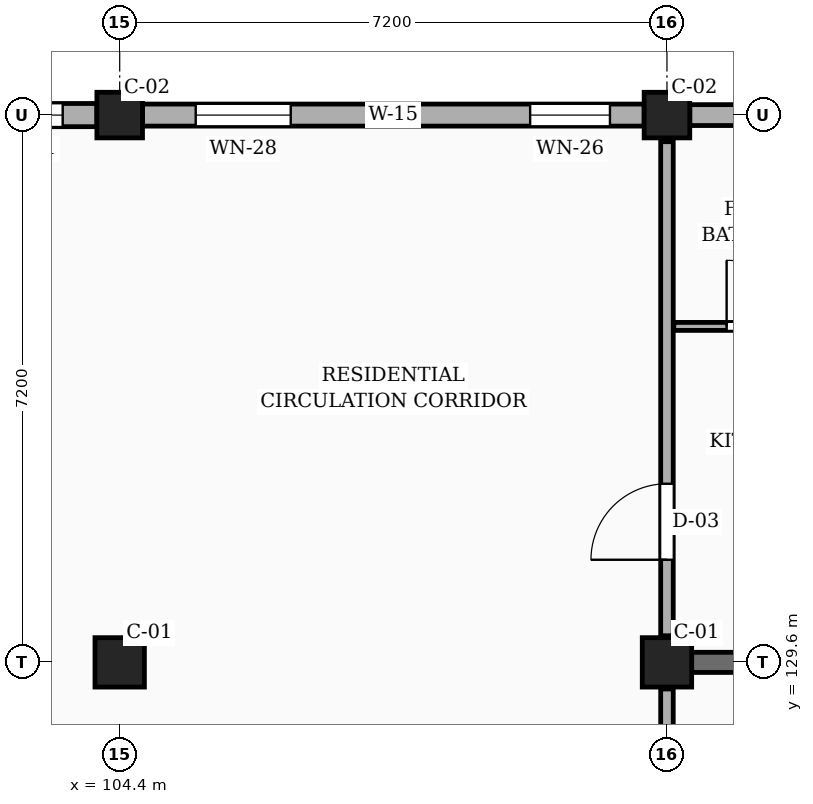
"""IFC4 building model, lengths in metres.
Left out: names, types, materials, properties, quantities, classifications, styles, units other than length and angle.
Written with IfcOpenShell. Run it as: python <this file> out.ifc"""

import sys

from ifc_helpers import new_model, si_unit, direction, frame, frame_2d, origin, origin_2d, place, context, subcontext, project, spatial, rectangle, extrude, element, fill, save


model = new_model("IFC4")
c1 = context("Model", 3, precision=1e-05, world=origin(), true_north=direction((0.0, 1.0)))
c2 = subcontext(c1, "Body", "Model", "MODEL_VIEW")
j1 = project(units=[si_unit("LENGTHUNIT", "METRE"), si_unit("PLANEANGLEUNIT", "RADIAN")], contexts=[c1])
p1 = place(None, origin())
s1 = spatial("IfcSite", under=j1, at=p1, CompositionType="ELEMENT")
p2 = place(p1, origin())
s2 = spatial("IfcBuilding", under=s1, at=p2, CompositionType="ELEMENT")
p3 = place(p2, frame((0.0, 0.0, 4.5)))
s3 = spatial("IfcBuildingStorey", under=s2, at=p3, CompositionType="ELEMENT", Elevation=4.5)
p4 = place(p3, frame((104.4, 129.6, 0.0), z_axis=(0.0, 0.0, 1.0), x_axis=(1.0, 0.0, 0.0)))
e1 = element("IfcColumn", 1, at=p4, inside=s3, PredefinedType="COLUMN", context=c2, shape_type="SweptSolid", body=[
    extrude(rectangle(XDim=0.65, YDim=0.65, at=origin_2d()), origin(), (0.0, 0.0, 1.0), 3.15),
])
p5 = place(p3, frame((104.4, 136.8, 0.0), z_axis=(0.0, 0.0, 1.0), x_axis=(1.0, 0.0, 0.0)))
e2 = element("IfcColumn", 2, at=p5, inside=s3, PredefinedType="COLUMN", context=c2, shape_type="SweptSolid", body=[
    extrude(rectangle(XDim=0.6, YDim=0.6, at=origin_2d()), origin(), (0.0, 0.0, 1.0), 3.15),
])
p6 = place(p3, frame((111.6, 129.6, 0.0), z_axis=(0.0, 0.0, 1.0), x_axis=(1.0, 0.0, 0.0)))
e3 = element("IfcColumn", 3, at=p6, inside=s3, PredefinedType="COLUMN", context=c2, shape_type="SweptSolid", body=[
    extrude(rectangle(XDim=0.65, YDim=0.65, at=origin_2d()), origin(), (0.0, 0.0, 1.0), 3.15),
])
p7 = place(p3, frame((111.6, 136.8, 0.0), z_axis=(0.0, 0.0, 1.0), x_axis=(1.0, 0.0, 0.0)))
e4 = element("IfcColumn", 4, at=p7, inside=s3, PredefinedType="COLUMN", context=c2, shape_type="SweptSolid", body=[
    extrude(rectangle(XDim=0.6, YDim=0.6, at=origin_2d()), origin(), (0.0, 0.0, 1.0), 3.15),
])
p8 = place(p3, frame((111.925, 129.6, 0.0), z_axis=(0.0, 0.0, 1.0), x_axis=(1.0, 0.0, 0.0)))
e5 = element("IfcWall", 5, at=p8, inside=s3, PredefinedType="SOLIDWALL", context=c2, shape_type="SweptSolid", body=[
    extrude(rectangle(XDim=6.575, YDim=0.265, at=frame_2d((3.288, 0.0))), origin(), (0.0, 0.0, 1.0), 2.19),
])
p9 = place(p3, frame((118.5, 136.8, 0.0), z_axis=(0.0, 0.0, 1.0), x_axis=(-1.0, 0.0, 0.0)))
e6 = element("IfcWall", 6, at=p9, inside=s3, PredefinedType="SOLIDWALL", context=c2, shape_type="SweptSolid", body=[
    extrude(rectangle(XDim=6.6, YDim=0.275, at=frame_2d((3.3, 0.0))), origin(), (0.0, 0.0, 1.0), 2.46),
])
p10 = place(p9, frame((1.58, 0.0, 0.78)))
e7 = element("IfcOpeningElement", 7, at=p10, cuts=e6, PredefinedType="OPENING", context=c2, shape_type="SweptSolid", body=[
    extrude(rectangle(XDim=1.46, YDim=1.36, at=frame_2d((0.73, 0.68))), frame((0.0, 0.147, 0.0), z_axis=(0.0, -1.0, 0.0), x_axis=(1.0, 0.0, 0.0)), (0.0, 0.0, 1.0), 0.295),
])
p11 = place(p9, frame((4.945, 0.0, 0.78)))
e8 = element("IfcOpeningElement", 8, at=p11, cuts=e6, PredefinedType="OPENING", context=c2, shape_type="SweptSolid", body=[
    extrude(rectangle(XDim=1.05, YDim=1.44, at=frame_2d((0.525, 0.72))), frame((0.0, 0.147, 0.0), z_axis=(0.0, -1.0, 0.0), x_axis=(1.0, 0.0, 0.0)), (0.0, 0.0, 1.0), 0.295),
])
p12 = place(p3, frame((111.3, 136.8, 0.0), z_axis=(0.0, 0.0, 1.0), x_axis=(-1.0, 0.0, 0.0)))
e9 = element("IfcWall", 9, at=p12, inside=s3, PredefinedType="SOLIDWALL", context=c2, shape_type="SweptSolid", body=[
    extrude(rectangle(XDim=6.6, YDim=0.29, at=frame_2d((3.3, 0.0))), origin(), (0.0, 0.0, 1.0), 2.46),
])
p13 = place(p12, frame((0.45, 0.0, 0.78)))
e10 = element("IfcOpeningElement", 10, at=p13, cuts=e9, PredefinedType="OPENING", context=c2, shape_type="SweptSolid", body=[
    extrude(rectangle(XDim=1.05, YDim=1.44, at=frame_2d((0.525, 0.72))), frame((0.0, 0.155, 0.0), z_axis=(0.0, -1.0, 0.0), x_axis=(1.0, 0.0, 0.0)), (0.0, 0.0, 1.0), 0.31),
])
p14 = place(p12, frame((4.65, 0.0, 0.78)))
e11 = element("IfcOpeningElement", 11, at=p14, cuts=e9, PredefinedType="OPENING", context=c2, shape_type="SweptSolid", body=[
    extrude(rectangle(XDim=1.25, YDim=1.44, at=frame_2d((0.625, 0.72))), frame((0.0, 0.155, 0.0), z_axis=(0.0, -1.0, 0.0), x_axis=(1.0, 0.0, 0.0)), (0.0, 0.0, 1.0), 0.31),
])
p15 = place(p3, frame((104.1, 136.8, 0.0), z_axis=(0.0, 0.0, 1.0), x_axis=(-1.0, 0.0, 0.0)))
e12 = element("IfcWall", 12, at=p15, inside=s3, PredefinedType="SOLIDWALL", context=c2, shape_type="SweptSolid", body=[
    extrude(rectangle(XDim=6.6, YDim=0.305, at=frame_2d((3.3, 0.0))), origin(), (0.0, 0.0, 1.0), 2.46),
])
p16 = place(p15, frame((0.45, 0.0, 0.78)))
e13 = element("IfcOpeningElement", 13, at=p16, cuts=e12, PredefinedType="OPENING", context=c2, shape_type="SweptSolid", body=[
    extrude(rectangle(XDim=1.04, YDim=1.26, at=frame_2d((0.52, 0.63))), frame((0.0, 0.163, 0.0), z_axis=(0.0, -1.0, 0.0), x_axis=(1.0, 0.0, 0.0)), (0.0, 0.0, 1.0), 0.325),
])
p17 = place(p15, frame((2.715, 0.0, 0.78)))
e14 = element("IfcOpeningElement", 14, at=p17, cuts=e12, PredefinedType="OPENING", context=c2, shape_type="SweptSolid", body=[
    extrude(rectangle(XDim=1.45, YDim=1.44, at=frame_2d((0.725, 0.72))), frame((0.0, 0.163, 0.0), z_axis=(0.0, -1.0, 0.0), x_axis=(1.0, 0.0, 0.0)), (0.0, 0.0, 1.0), 0.325),
])
p18 = place(p3, frame((111.6, 122.75, 0.0), z_axis=(0.0, 0.0, 1.0), x_axis=(0.0, 1.0, 0.0)))
e15 = element("IfcWall", 15, at=p18, inside=s3, PredefinedType="PARTITIONING", context=c2, shape_type="SweptSolid", body=[
    extrude(rectangle(XDim=6.5, YDim=0.165, at=frame_2d((3.25, 0.0))), origin(), (0.0, 0.0, 1.0), 2.24),
])
p19 = place(p18, frame((1.0, 0.0, 0.0)))
e16 = element("IfcOpeningElement", 16, at=p19, cuts=e15, PredefinedType="OPENING", context=c2, shape_type="SweptSolid", body=[
    extrude(rectangle(XDim=1.14, YDim=2.18, at=frame_2d((0.57, 1.09))), frame((0.0, 0.093, 0.0), z_axis=(0.0, -1.0, 0.0), x_axis=(1.0, 0.0, 0.0)), (0.0, 0.0, 1.0), 0.185),
])
p20 = place(p3, frame((111.6, 129.95, 0.0), z_axis=(0.0, 0.0, 1.0), x_axis=(0.0, 1.0, 0.0)))
e17 = element("IfcWall", 17, at=p20, inside=s3, PredefinedType="PARTITIONING", context=c2, shape_type="SweptSolid", body=[
    extrude(rectangle(XDim=6.5, YDim=0.165, at=frame_2d((3.25, 0.0))), origin(), (0.0, 0.0, 1.0), 2.24),
])
p21 = place(p20, frame((1.0, 0.0, 0.0)))
e18 = element("IfcOpeningElement", 18, at=p21, cuts=e17, PredefinedType="OPENING", context=c2, shape_type="SweptSolid", body=[
    extrude(rectangle(XDim=1.0, YDim=2.15, at=frame_2d((0.5, 1.075))), frame((0.0, 0.093, 0.0), z_axis=(0.0, -1.0, 0.0), x_axis=(1.0, 0.0, 0.0)), (0.0, 0.0, 1.0), 0.185),
])
p22 = place(p3, frame((111.69, 134.02, 0.0), z_axis=(0.0, 0.0, 1.0), x_axis=(1.0, 0.0, 0.0)))
e19 = element("IfcWall", 19, at=p22, inside=s3, PredefinedType="PARTITIONING", context=c2, shape_type="SweptSolid", body=[
    extrude(rectangle(XDim=2.26, YDim=0.105, at=frame_2d((1.13, 0.0))), origin(), (0.0, 0.0, 1.0), 2.325),
])
p23 = place(p22, frame((0.695, 0.0, 0.0)))
e20 = element("IfcOpeningElement", 20, at=p23, cuts=e19, PredefinedType="OPENING", context=c2, shape_type="SweptSolid", body=[
    extrude(rectangle(XDim=0.87, YDim=2.05, at=frame_2d((0.435, 1.025))), frame((0.0, 0.062, 0.0), z_axis=(0.0, -1.0, 0.0), x_axis=(1.0, 0.0, 0.0)), (0.0, 0.0, 1.0), 0.125),
])
p24 = place(p13, origin())
e21 = element("IfcWindow", 21, at=p24, inside=s3, PartitioningType="SINGLE_PANEL", PredefinedType="WINDOW", context=c2, shape_type="SweptSolid", body=[
    extrude(rectangle(XDim=1.05, YDim=1.44, at=frame_2d((0.525, 0.72))), frame((0.0, 0.03, 0.0), z_axis=(0.0, -1.0, 0.0), x_axis=(1.0, 0.0, 0.0)), (0.0, 0.0, 1.0), 0.06),
])
fill(e10, e21)
p25 = place(p14, origin())
e22 = element("IfcWindow", 22, at=p25, inside=s3, PartitioningType="SINGLE_PANEL", PredefinedType="WINDOW", context=c2, shape_type="SweptSolid", body=[
    extrude(rectangle(XDim=1.25, YDim=1.44, at=frame_2d((0.625, 0.72))), frame((0.0, 0.03, 0.0), z_axis=(0.0, -1.0, 0.0), x_axis=(1.0, 0.0, 0.0)), (0.0, 0.0, 1.0), 0.06),
])
fill(e11, e22)
p26 = place(p16, origin())
e23 = element("IfcWindow", 23, at=p26, inside=s3, PartitioningType="SINGLE_PANEL", PredefinedType="WINDOW", context=c2, shape_type="SweptSolid", body=[
    extrude(rectangle(XDim=1.04, YDim=1.26, at=frame_2d((0.52, 0.63))), frame((0.0, 0.03, 0.0), z_axis=(0.0, -1.0, 0.0), x_axis=(1.0, 0.0, 0.0)), (0.0, 0.0, 1.0), 0.06),
])
fill(e13, e23)
p27 = place(p21, origin())
e24 = element("IfcDoor", 24, at=p27, inside=s3, OperationType="SINGLE_SWING_LEFT", PredefinedType="DOOR", context=c2, shape_type="SweptSolid", body=[
    extrude(rectangle(XDim=1.0, YDim=2.15, at=frame_2d((0.5, 1.075))), frame((0.0, 0.025, 0.0), z_axis=(0.0, -1.0, 0.0), x_axis=(1.0, 0.0, 0.0)), (0.0, 0.0, 1.0), 0.05),
])
fill(e18, e24)
p28 = place(p23, origin())
e25 = element("IfcDoor", 25, at=p28, inside=s3, OperationType="SINGLE_SWING_LEFT", PredefinedType="DOOR", context=c2, shape_type="SweptSolid", body=[
    extrude(rectangle(XDim=0.87, YDim=2.05, at=frame_2d((0.435, 1.025))), frame((0.0, 0.025, 0.0), z_axis=(0.0, -1.0, 0.0), x_axis=(1.0, 0.0, 0.0)), (0.0, 0.0, 1.0), 0.05),
])
fill(e20, e25)
save(model, sys.argv[1])
